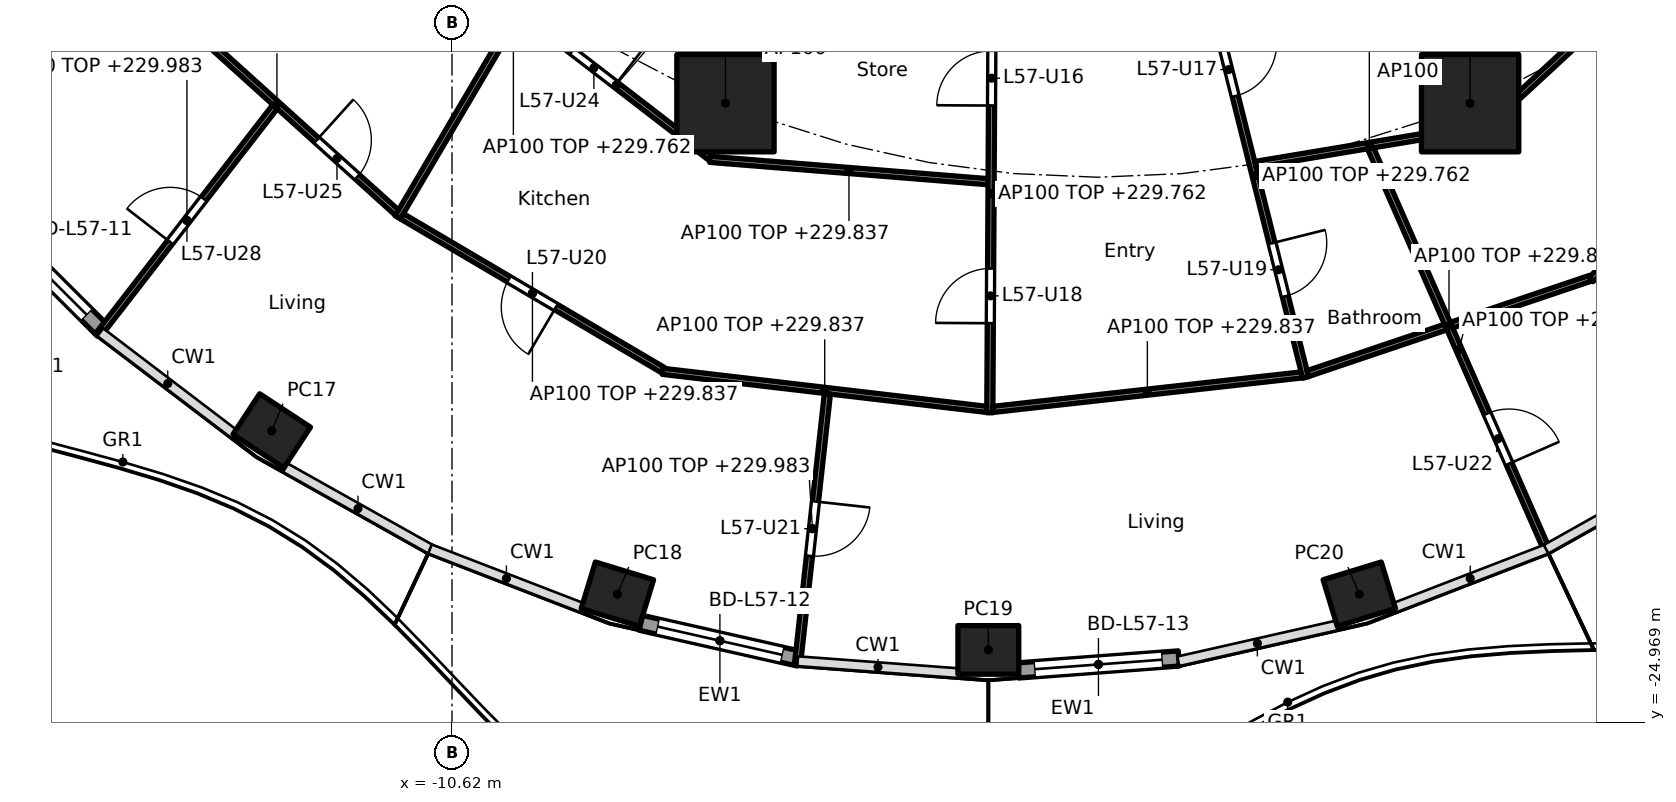
"""IFC4 building model, lengths in metres.
Left out: names, types, materials, properties, quantities, classifications, styles, units other than length and angle.
Written with IfcOpenShell. Run it as: python <this file> out.ifc"""

import sys

from ifc_helpers import new_model, si_unit, direction, frame, frame_2d, origin, origin_2d, place, context, subcontext, project, spatial, rectangle, hollow_rectangle, extrude, element, fill, save


model = new_model("IFC4")
c1 = context("Model", 3, precision=1e-05, world=origin(), true_north=direction((0.0, 1.0)))
c2 = subcontext(c1, "Body", "Model", "MODEL_VIEW")
j1 = project(units=[si_unit("LENGTHUNIT", "METRE"), si_unit("PLANEANGLEUNIT", "RADIAN")], contexts=[c1])
p1 = place(None, origin())
s1 = spatial("IfcSite", under=j1, at=p1, CompositionType="ELEMENT")
p2 = place(p1, origin())
s2 = spatial("IfcBuilding", under=s1, at=p2, CompositionType="ELEMENT")
p3 = place(p2, frame((0.0, 0.0, 227.0)))
s3 = spatial("IfcBuildingStorey", under=s2, at=p3, CompositionType="ELEMENT", Elevation=227.0)
for number, where, z_axis, x_axis in (
    (1, (-13.585, -20.17, 0.0), (0.0, 0.0, 1.0), (0.836, -0.549, 0.0)),
    (2, (-7.9, -22.856, 0.0), (0.0, 0.0, 1.0), (0.957, -0.292, 0.0)),
    (3, (-1.8, -23.772, 0.0), (0.0, 0.0, 1.0), (1.0, 0.0, 0.0)),
    (4, (4.3, -22.856, 0.0), (0.0, 0.0, 1.0), (0.957, 0.292, 0.0)),
):
    element("IfcColumn", number, at=place(p3, frame(where, z_axis=z_axis, x_axis=x_axis)), inside=s3, PredefinedType="COLUMN", context=c2, shape_type="SweptSolid", body=[
        extrude(hollow_rectangle(XDim=1.0, YDim=0.8, WallThickness=0.032, at=origin_2d()), origin(), (0.0, 0.0, 1.0), 3.7),
    ])
for number, where, z_axis, x_axis in (
    (5, (-6.123, -14.782, 0.0), (0.0, 0.0, 1.0), (1.0, 0.0, 0.0)),
    (6, (6.123, -14.782, 0.0), (0.0, 0.0, 1.0), (1.0, 0.0, 0.0)),
):
    element("IfcColumn", number, at=place(p3, frame(where, z_axis=z_axis, x_axis=x_axis)), inside=s3, PredefinedType="COLUMN", context=c2, shape_type="SweptSolid", body=[
        extrude(rectangle(XDim=1.6, YDim=1.6, at=origin_2d()), origin(), (0.0, 0.0, 1.0), 3.7),
    ])
p4 = place(p3, frame((-16.365, -18.524, 0.0), z_axis=(0.0, 0.0, 1.0), x_axis=(-0.707878871612, 0.706333846793, 0.0)))
e7 = element("IfcWall", 7, at=p4, inside=s3, PredefinedType="SOLIDWALL", context=c2, shape_type="SweptSolid", body=[
    extrude(rectangle(XDim=2.844, YDim=0.25, at=frame_2d((1.422, 0.0))), origin(), (0.0, 0.0, 1.0), 3.44),
])
p5 = place(p4, frame((0.372, 0.0, 0.0)))
e8 = element("IfcOpeningElement", 8, at=p5, cuts=e7, PredefinedType="OPENING", context=c2, shape_type="SweptSolid", body=[
    extrude(rectangle(XDim=2.1, YDim=2.4, at=frame_2d((1.05, 1.2))), frame((0.0, 0.135, 0.0), z_axis=(0.0, -1.0, 0.0), x_axis=(1.0, 0.0, 0.0)), (0.0, 0.0, 1.0), 0.27),
])
p6 = place(p3, frame((-4.914, -23.916, 0.0), z_axis=(0.0, 0.0, 1.0), x_axis=(-0.975324089124, 0.220777990694, 0.0)))
e9 = element("IfcWall", 9, at=p6, inside=s3, PredefinedType="SOLIDWALL", context=c2, shape_type="SweptSolid", body=[
    extrude(rectangle(XDim=2.666, YDim=0.25, at=frame_2d((1.333, 0.0))), origin(), (0.0, 0.0, 1.0), 3.44),
])
p7 = place(p6, frame((0.283, 0.0, 0.0)))
e10 = element("IfcOpeningElement", 10, at=p7, cuts=e9, PredefinedType="OPENING", context=c2, shape_type="SweptSolid", body=[
    extrude(rectangle(XDim=2.1, YDim=2.4, at=frame_2d((1.05, 1.2))), frame((0.0, 0.135, 0.0), z_axis=(0.0, -1.0, 0.0), x_axis=(1.0, 0.0, 0.0)), (0.0, 0.0, 1.0), 0.27),
])
p8 = place(p3, frame((1.333, -23.913, 0.0), z_axis=(0.0, 0.0, 1.0), x_axis=(-0.997233722033, -0.074329695546, 0.0)))
e11 = element("IfcWall", 11, at=p8, inside=s3, PredefinedType="SOLIDWALL", context=c2, shape_type="SweptSolid", body=[
    extrude(rectangle(XDim=2.651, YDim=0.25, at=frame_2d((1.325, 0.0))), origin(), (0.0, 0.0, 1.0), 3.44),
])
p9 = place(p8, frame((0.275, 0.0, 0.0)))
e12 = element("IfcOpeningElement", 12, at=p9, cuts=e11, PredefinedType="OPENING", context=c2, shape_type="SweptSolid", body=[
    extrude(rectangle(XDim=2.1, YDim=2.4, at=frame_2d((1.05, 1.2))), frame((0.0, 0.135, 0.0), z_axis=(0.0, -1.0, 0.0), x_axis=(1.0, 0.0, 0.0)), (0.0, 0.0, 1.0), 0.27),
])
p10 = place(p3, frame((-15.474, -13.019, 0.0), z_axis=(0.0, 0.0, 1.0), x_axis=(0.742348572616, -0.670013878017, 0.0)))
e13 = element("IfcWall", 13, at=p10, inside=s3, PredefinedType="PARTITIONING", context=c2, shape_type="SweptSolid", body=[
    extrude(rectangle(XDim=5.319, YDim=0.1, at=frame_2d((2.66, 0.0))), origin(), (0.0, 0.0, 1.0), 2.837),
])
p11 = place(p10, frame((3.54, 0.0, 0.0)))
e14 = element("IfcOpeningElement", 14, at=p11, cuts=e13, PredefinedType="OPENING", context=c2, shape_type="SweptSolid", body=[
    extrude(rectangle(XDim=0.9, YDim=2.1, at=frame_2d((0.45, 1.05))), frame((0.0, 0.06, 0.0), z_axis=(0.0, -1.0, 0.0), x_axis=(1.0, 0.0, 0.0)), (0.0, 0.0, 1.0), 0.12),
])
p12 = place(p3, frame((-13.53, -14.84, 0.0), z_axis=(0.0, 0.0, 1.0), x_axis=(-0.612546685222, -0.790434411209, 0.0)))
e15 = element("IfcWall", 15, at=p12, inside=s3, PredefinedType="PARTITIONING", context=c2, shape_type="SweptSolid", body=[
    extrude(rectangle(XDim=4.732, YDim=0.1, at=frame_2d((2.366, 0.0))), origin(), (0.0, 0.0, 1.0), 2.983),
])
p13 = place(p12, frame((1.916, 0.0, 0.0)))
e16 = element("IfcOpeningElement", 16, at=p13, cuts=e15, PredefinedType="OPENING", context=c2, shape_type="SweptSolid", body=[
    extrude(rectangle(XDim=0.9, YDim=2.1, at=frame_2d((0.45, 1.05))), frame((0.0, 0.06, 0.0), z_axis=(0.0, -1.0, 0.0), x_axis=(1.0, 0.0, 0.0)), (0.0, 0.0, 1.0), 0.12),
])
p14 = place(p3, frame((-7.709, -10.198, 0.0), z_axis=(0.0, 0.0, 1.0), x_axis=(-0.507362999545, -0.861732433353, 0.0)))
e17 = element("IfcWall", 17, at=p14, inside=s3, PredefinedType="PARTITIONING", context=c2, shape_type="SweptSolid", body=[
    extrude(rectangle(XDim=7.499, YDim=0.1, at=frame_2d((3.749, 0.0))), origin(), (0.0, 0.0, 1.0), 2.762),
])
p15 = place(p14, frame((1.326, 0.0, 0.0)))
e18 = element("IfcOpeningElement", 18, at=p15, cuts=e17, PredefinedType="OPENING", context=c2, shape_type="SweptSolid", body=[
    extrude(rectangle(XDim=0.9, YDim=2.1, at=frame_2d((0.45, 1.05))), frame((0.0, 0.06, 0.0), z_axis=(0.0, -1.0, 0.0), x_axis=(1.0, 0.0, 0.0)), (0.0, 0.0, 1.0), 0.12),
])
p16 = place(p3, frame((-9.471, -13.289, 0.0), z_axis=(0.0, 0.0, 1.0), x_axis=(0.7922205419, -0.61023488346, 0.0)))
e19 = element("IfcWall", 19, at=p16, inside=s3, PredefinedType="PARTITIONING", context=c2, shape_type="SweptSolid", body=[
    extrude(rectangle(XDim=3.916, YDim=0.1, at=frame_2d((1.958, 0.0))), origin(), (0.0, 0.0, 1.0), 2.837),
])
p17 = place(p16, frame((1.045, 0.0, 0.0)))
e20 = element("IfcOpeningElement", 20, at=p17, cuts=e19, PredefinedType="OPENING", context=c2, shape_type="SweptSolid", body=[
    extrude(rectangle(XDim=0.9, YDim=2.1, at=frame_2d((0.45, 1.05))), frame((0.0, 0.06, 0.0), z_axis=(0.0, -1.0, 0.0), x_axis=(1.0, 0.0, 0.0)), (0.0, 0.0, 1.0), 0.12),
])
p18 = place(p3, frame((-11.445, -16.641, 0.0), z_axis=(0.0, 0.0, 1.0), x_axis=(0.861562560957, -0.507651409489, 0.0)))
e21 = element("IfcWall", 21, at=p18, inside=s3, PredefinedType="PARTITIONING", context=c2, shape_type="SweptSolid", body=[
    extrude(rectangle(XDim=4.985, YDim=0.1, at=frame_2d((2.492, 0.0))), origin(), (0.0, 0.0, 1.0), 2.837),
])
p19 = place(p18, frame((2.042, 0.0, 0.0)))
e22 = element("IfcOpeningElement", 22, at=p19, cuts=e21, PredefinedType="OPENING", context=c2, shape_type="SweptSolid", body=[
    extrude(rectangle(XDim=0.9, YDim=2.1, at=frame_2d((0.45, 1.05))), frame((0.0, 0.06, 0.0), z_axis=(0.0, -1.0, 0.0), x_axis=(1.0, 0.0, 0.0)), (0.0, 0.0, 1.0), 0.12),
])
p20 = place(p3, frame((-5.243, -12.657, 0.0), z_axis=(0.0, 0.0, 1.0), x_axis=(-0.382719158442, -0.923864733477, 0.0)))
e23 = element("IfcWall", 23, at=p20, inside=s3, PredefinedType="PARTITIONING", context=c2, shape_type="SweptSolid", body=[
    extrude(rectangle(XDim=2.25, YDim=0.1, at=frame_2d((1.125, 0.0))), origin(), (0.0, 0.0, 1.0), 3.44),
])
p21 = place(p3, frame((-6.379, -15.705, 0.0), z_axis=(0.0, 0.0, 1.0), x_axis=(0.996786462227, -0.080104611105, 0.0)))
e24 = element("IfcWall", 24, at=p21, inside=s3, PredefinedType="PARTITIONING", context=c2, shape_type="SweptSolid", body=[
    extrude(rectangle(XDim=4.59, YDim=0.1, at=frame_2d((2.295, 0.0))), origin(), (0.0, 0.0, 1.0), 2.837),
])
p22 = place(p3, frame((-7.156, -19.191, 0.0), z_axis=(0.0, 0.0, 1.0), x_axis=(0.993172627718, -0.116653896424, 0.0)))
e25 = element("IfcWall", 25, at=p22, inside=s3, PredefinedType="PARTITIONING", context=c2, shape_type="SweptSolid", body=[
    extrude(rectangle(XDim=5.368, YDim=0.1, at=frame_2d((2.684, 0.0))), origin(), (0.0, 0.0, 1.0), 2.837),
])
p23 = place(p3, frame((-4.447, -19.56, 0.0), z_axis=(0.0, 0.0, 1.0), x_axis=(-0.109897425445, -0.993942933915, 0.0)))
e26 = element("IfcWall", 26, at=p23, inside=s3, PredefinedType="PARTITIONING", context=c2, shape_type="SweptSolid", body=[
    extrude(rectangle(XDim=4.465, YDim=0.1, at=frame_2d((2.233, 0.0))), origin(), (0.0, 0.0, 1.0), 2.983),
])
p24 = place(p23, frame((1.783, 0.0, 0.0)))
e27 = element("IfcOpeningElement", 27, at=p24, cuts=e26, PredefinedType="OPENING", context=c2, shape_type="SweptSolid", body=[
    extrude(rectangle(XDim=0.9, YDim=2.1, at=frame_2d((0.45, 1.05))), frame((0.0, 0.06, 0.0), z_axis=(0.0, -1.0, 0.0), x_axis=(1.0, 0.0, 0.0)), (0.0, 0.0, 1.0), 0.12),
])
p25 = place(p3, frame((-1.735, -12.665, 0.0), z_axis=(0.0, 0.0, 1.0), x_axis=(-0.005554152823, -0.999984575574, 0.0)))
e28 = element("IfcWall", 28, at=p25, inside=s3, PredefinedType="PARTITIONING", context=c2, shape_type="SweptSolid", body=[
    extrude(rectangle(XDim=7.209, YDim=0.1, at=frame_2d((3.604, 0.0))), origin(), (0.0, 0.0, 1.0), 2.762),
])
p26 = place(p25, frame((1.256, 0.0, 0.0)))
e29 = element("IfcOpeningElement", 29, at=p26, cuts=e28, PredefinedType="OPENING", context=c2, shape_type="SweptSolid", body=[
    extrude(rectangle(XDim=0.9, YDim=2.1, at=frame_2d((0.45, 1.05))), frame((0.0, 0.06, 0.0), z_axis=(0.0, -1.0, 0.0), x_axis=(1.0, 0.0, 0.0)), (0.0, 0.0, 1.0), 0.12),
])
p27 = place(p25, frame((4.836, 0.0, 0.0)))
e30 = element("IfcOpeningElement", 30, at=p27, cuts=e28, PredefinedType="OPENING", context=c2, shape_type="SweptSolid", body=[
    extrude(rectangle(XDim=0.9, YDim=2.1, at=frame_2d((0.45, 1.05))), frame((0.0, 0.06, 0.0), z_axis=(0.0, -1.0, 0.0), x_axis=(1.0, 0.0, 0.0)), (0.0, 0.0, 1.0), 0.12),
])
p28 = place(p3, frame((-1.726, -19.818, 0.0), z_axis=(0.0, 0.0, 1.0), x_axis=(0.99381893047, 0.111013212902, 0.0)))
e31 = element("IfcWall", 31, at=p28, inside=s3, PredefinedType="PARTITIONING", context=c2, shape_type="SweptSolid", body=[
    extrude(rectangle(XDim=5.113, YDim=0.1, at=frame_2d((2.557, 0.0))), origin(), (0.0, 0.0, 1.0), 2.837),
])
p29 = place(p3, frame((1.759, -12.662, 0.0), z_axis=(0.0, 0.0, 1.0), x_axis=(0.242653275363, -0.970113079984, 0.0)))
e32 = element("IfcWall", 32, at=p29, inside=s3, PredefinedType="PARTITIONING", context=c2, shape_type="SweptSolid", body=[
    extrude(rectangle(XDim=6.836, YDim=0.1, at=frame_2d((3.418, 0.0))), origin(), (0.0, 0.0, 1.0), 2.762),
])
p30 = place(p29, frame((1.166, 0.0, 0.0)))
e33 = element("IfcOpeningElement", 33, at=p30, cuts=e32, PredefinedType="OPENING", context=c2, shape_type="SweptSolid", body=[
    extrude(rectangle(XDim=0.9, YDim=2.1, at=frame_2d((0.45, 1.05))), frame((0.0, 0.06, 0.0), z_axis=(0.0, -1.0, 0.0), x_axis=(1.0, 0.0, 0.0)), (0.0, 0.0, 1.0), 0.12),
])
p31 = place(p29, frame((4.559, 0.0, 0.0)))
e34 = element("IfcOpeningElement", 34, at=p31, cuts=e32, PredefinedType="OPENING", context=c2, shape_type="SweptSolid", body=[
    extrude(rectangle(XDim=0.9, YDim=2.1, at=frame_2d((0.45, 1.05))), frame((0.0, 0.06, 0.0), z_axis=(0.0, -1.0, 0.0), x_axis=(1.0, 0.0, 0.0)), (0.0, 0.0, 1.0), 0.12),
])
p32 = place(p3, frame((2.593, -15.789, 0.0), z_axis=(0.0, 0.0, 1.0), x_axis=(0.986381756816, 0.164471972749, 0.0)))
e35 = element("IfcWall", 35, at=p32, inside=s3, PredefinedType="PARTITIONING", context=c2, shape_type="SweptSolid", body=[
    extrude(rectangle(XDim=3.797, YDim=0.1, at=frame_2d((1.898, 0.0))), origin(), (0.0, 0.0, 1.0), 2.837),
])
p33 = place(p3, frame((3.453, -19.229, 0.0), z_axis=(0.0, 0.0, 1.0), x_axis=(0.947572025416, 0.319542261133, 0.0)))
e36 = element("IfcWall", 36, at=p33, inside=s3, PredefinedType="PARTITIONING", context=c2, shape_type="SweptSolid", body=[
    extrude(rectangle(XDim=4.903, YDim=0.1, at=frame_2d((2.451, 0.0))), origin(), (0.0, 0.0, 1.0), 2.837),
])
p34 = place(p3, frame((4.485, -15.522, 0.0), z_axis=(0.0, 0.0, 1.0), x_axis=(0.401959715825, -0.915657352318, 0.0)))
e37 = element("IfcWall", 37, at=p34, inside=s3, PredefinedType="PARTITIONING", context=c2, shape_type="SweptSolid", body=[
    extrude(rectangle(XDim=7.239, YDim=0.1, at=frame_2d((3.619, 0.0))), origin(), (0.0, 0.0, 1.0), 2.983),
])
p35 = place(p34, frame((4.767, 0.0, 0.0)))
e38 = element("IfcOpeningElement", 38, at=p35, cuts=e37, PredefinedType="OPENING", context=c2, shape_type="SweptSolid", body=[
    extrude(rectangle(XDim=0.9, YDim=2.1, at=frame_2d((0.45, 1.05))), frame((0.0, 0.06, 0.0), z_axis=(0.0, -1.0, 0.0), x_axis=(1.0, 0.0, 0.0)), (0.0, 0.0, 1.0), 0.12),
])
p36 = place(p3, frame((5.243, -12.657, 0.0), z_axis=(0.0, 0.0, 1.0), x_axis=(0.382719158442, -0.923864733477, 0.0)))
e39 = element("IfcWall", 39, at=p36, inside=s3, PredefinedType="PARTITIONING", context=c2, shape_type="SweptSolid", body=[
    extrude(rectangle(XDim=2.25, YDim=0.1, at=frame_2d((1.125, 0.0))), origin(), (0.0, 0.0, 1.0), 3.44),
])
p37 = place(p3, frame((6.351, -15.19, 0.0), z_axis=(0.0, 0.0, 1.0), x_axis=(0.73462674599, 0.678471476243, 0.0)))
e40 = element("IfcWall", 40, at=p37, inside=s3, PredefinedType="PARTITIONING", context=c2, shape_type="SweptSolid", body=[
    extrude(rectangle(XDim=5.987, YDim=0.1, at=frame_2d((2.993, 0.0))), origin(), (0.0, 0.0, 1.0), 2.837),
])
p38 = place(p37, frame((2.568, 0.0, 0.0)))
e41 = element("IfcOpeningElement", 41, at=p38, cuts=e40, PredefinedType="OPENING", context=c2, shape_type="SweptSolid", body=[
    extrude(rectangle(XDim=0.9, YDim=2.1, at=frame_2d((0.45, 1.05))), frame((0.0, 0.06, 0.0), z_axis=(0.0, -1.0, 0.0), x_axis=(1.0, 0.0, 0.0)), (0.0, 0.0, 1.0), 0.12),
])
p39 = place(p3, frame((8.109, -17.679, 0.0), z_axis=(0.0, 0.0, 1.0), x_axis=(0.743675165651, 0.668541134108, 0.0)))
e42 = element("IfcWall", 42, at=p39, inside=s3, PredefinedType="PARTITIONING", context=c2, shape_type="SweptSolid", body=[
    extrude(rectangle(XDim=6.275, YDim=0.1, at=frame_2d((3.137, 0.0))), origin(), (0.0, 0.0, 1.0), 2.837),
])
p40 = place(p39, frame((2.712, 0.0, 0.0)))
e43 = element("IfcOpeningElement", 43, at=p40, cuts=e42, PredefinedType="OPENING", context=c2, shape_type="SweptSolid", body=[
    extrude(rectangle(XDim=0.9, YDim=2.1, at=frame_2d((0.45, 1.05))), frame((0.0, 0.06, 0.0), z_axis=(0.0, -1.0, 0.0), x_axis=(1.0, 0.0, 0.0)), (0.0, 0.0, 1.0), 0.12),
])
p41 = place(p5, origin())
e44 = element("IfcDoor", 44, at=p41, inside=s3, OperationType="SLIDING_TO_LEFT", PredefinedType="DOOR", context=c2, shape_type="SweptSolid", body=[
    extrude(rectangle(XDim=2.1, YDim=2.4, at=frame_2d((1.05, 1.2))), frame((0.0, 0.025, 0.0), z_axis=(0.0, -1.0, 0.0), x_axis=(1.0, 0.0, 0.0)), (0.0, 0.0, 1.0), 0.05),
])
fill(e8, e44)
p42 = place(p7, origin())
e45 = element("IfcDoor", 45, at=p42, inside=s3, OperationType="SLIDING_TO_LEFT", PredefinedType="DOOR", context=c2, shape_type="SweptSolid", body=[
    extrude(rectangle(XDim=2.1, YDim=2.4, at=frame_2d((1.05, 1.2))), frame((0.0, 0.025, 0.0), z_axis=(0.0, -1.0, 0.0), x_axis=(1.0, 0.0, 0.0)), (0.0, 0.0, 1.0), 0.05),
])
fill(e10, e45)
p43 = place(p9, origin())
e46 = element("IfcDoor", 46, at=p43, inside=s3, OperationType="SLIDING_TO_LEFT", PredefinedType="DOOR", context=c2, shape_type="SweptSolid", body=[
    extrude(rectangle(XDim=2.1, YDim=2.4, at=frame_2d((1.05, 1.2))), frame((0.0, 0.025, 0.0), z_axis=(0.0, -1.0, 0.0), x_axis=(1.0, 0.0, 0.0)), (0.0, 0.0, 1.0), 0.05),
])
fill(e12, e46)
p44 = place(p26, frame((0.9, 0.0, 0.0), x_axis=(-1.0, 0.0, 0.0)))
e47 = element("IfcDoor", 47, at=p44, inside=s3, OperationType="SINGLE_SWING_LEFT", PredefinedType="DOOR", context=c2, shape_type="SweptSolid", body=[
    extrude(rectangle(XDim=0.9, YDim=2.1, at=frame_2d((0.45, 1.05))), frame((0.0, 0.025, 0.0), z_axis=(0.0, -1.0, 0.0), x_axis=(1.0, 0.0, 0.0)), (0.0, 0.0, 1.0), 0.05),
])
fill(e29, e47)
p45 = place(p30, origin())
e48 = element("IfcDoor", 48, at=p45, inside=s3, OperationType="SINGLE_SWING_LEFT", PredefinedType="DOOR", context=c2, shape_type="SweptSolid", body=[
    extrude(rectangle(XDim=0.9, YDim=2.1, at=frame_2d((0.45, 1.05))), frame((0.0, 0.025, 0.0), z_axis=(0.0, -1.0, 0.0), x_axis=(1.0, 0.0, 0.0)), (0.0, 0.0, 1.0), 0.05),
])
fill(e33, e48)
p46 = place(p27, frame((0.9, 0.0, 0.0), x_axis=(-1.0, 0.0, 0.0)))
e49 = element("IfcDoor", 49, at=p46, inside=s3, OperationType="SINGLE_SWING_LEFT", PredefinedType="DOOR", context=c2, shape_type="SweptSolid", body=[
    extrude(rectangle(XDim=0.9, YDim=2.1, at=frame_2d((0.45, 1.05))), frame((0.0, 0.025, 0.0), z_axis=(0.0, -1.0, 0.0), x_axis=(1.0, 0.0, 0.0)), (0.0, 0.0, 1.0), 0.05),
])
fill(e30, e49)
p47 = place(p31, origin())
e50 = element("IfcDoor", 50, at=p47, inside=s3, OperationType="SINGLE_SWING_LEFT", PredefinedType="DOOR", context=c2, shape_type="SweptSolid", body=[
    extrude(rectangle(XDim=0.9, YDim=2.1, at=frame_2d((0.45, 1.05))), frame((0.0, 0.025, 0.0), z_axis=(0.0, -1.0, 0.0), x_axis=(1.0, 0.0, 0.0)), (0.0, 0.0, 1.0), 0.05),
])
fill(e34, e50)
p48 = place(p19, frame((0.9, 0.0, 0.0), x_axis=(-1.0, 0.0, 0.0)))
e51 = element("IfcDoor", 51, at=p48, inside=s3, OperationType="SINGLE_SWING_LEFT", PredefinedType="DOOR", context=c2, shape_type="SweptSolid", body=[
    extrude(rectangle(XDim=0.9, YDim=2.1, at=frame_2d((0.45, 1.05))), frame((0.0, 0.025, 0.0), z_axis=(0.0, -1.0, 0.0), x_axis=(1.0, 0.0, 0.0)), (0.0, 0.0, 1.0), 0.05),
])
fill(e22, e51)
p49 = place(p24, origin())
e52 = element("IfcDoor", 52, at=p49, inside=s3, OperationType="SINGLE_SWING_LEFT", PredefinedType="DOOR", context=c2, shape_type="SweptSolid", body=[
    extrude(rectangle(XDim=0.9, YDim=2.1, at=frame_2d((0.45, 1.05))), frame((0.0, 0.025, 0.0), z_axis=(0.0, -1.0, 0.0), x_axis=(1.0, 0.0, 0.0)), (0.0, 0.0, 1.0), 0.05),
])
fill(e27, e52)
p50 = place(p35, origin())
e53 = element("IfcDoor", 53, at=p50, inside=s3, OperationType="SINGLE_SWING_RIGHT", PredefinedType="DOOR", context=c2, shape_type="SweptSolid", body=[
    extrude(rectangle(XDim=0.9, YDim=2.1, at=frame_2d((0.45, 1.05))), frame((0.0, 0.025, 0.0), z_axis=(0.0, -1.0, 0.0), x_axis=(1.0, 0.0, 0.0)), (0.0, 0.0, 1.0), 0.05),
])
fill(e38, e53)
p51 = place(p17, origin())
e54 = element("IfcDoor", 54, at=p51, inside=s3, OperationType="SINGLE_SWING_RIGHT", PredefinedType="DOOR", context=c2, shape_type="SweptSolid", body=[
    extrude(rectangle(XDim=0.9, YDim=2.1, at=frame_2d((0.45, 1.05))), frame((0.0, 0.025, 0.0), z_axis=(0.0, -1.0, 0.0), x_axis=(1.0, 0.0, 0.0)), (0.0, 0.0, 1.0), 0.05),
])
fill(e20, e54)
p52 = place(p11, origin())
e55 = element("IfcDoor", 55, at=p52, inside=s3, OperationType="SINGLE_SWING_LEFT", PredefinedType="DOOR", context=c2, shape_type="SweptSolid", body=[
    extrude(rectangle(XDim=0.9, YDim=2.1, at=frame_2d((0.45, 1.05))), frame((0.0, 0.025, 0.0), z_axis=(0.0, -1.0, 0.0), x_axis=(1.0, 0.0, 0.0)), (0.0, 0.0, 1.0), 0.05),
])
fill(e14, e55)
p53 = place(p13, frame((0.9, 0.0, 0.0), x_axis=(-1.0, 0.0, 0.0)))
e56 = element("IfcDoor", 56, at=p53, inside=s3, OperationType="SINGLE_SWING_LEFT", PredefinedType="DOOR", context=c2, shape_type="SweptSolid", body=[
    extrude(rectangle(XDim=0.9, YDim=2.1, at=frame_2d((0.45, 1.05))), frame((0.0, 0.025, 0.0), z_axis=(0.0, -1.0, 0.0), x_axis=(1.0, 0.0, 0.0)), (0.0, 0.0, 1.0), 0.05),
])
fill(e16, e56)
save(model, sys.argv[1])
